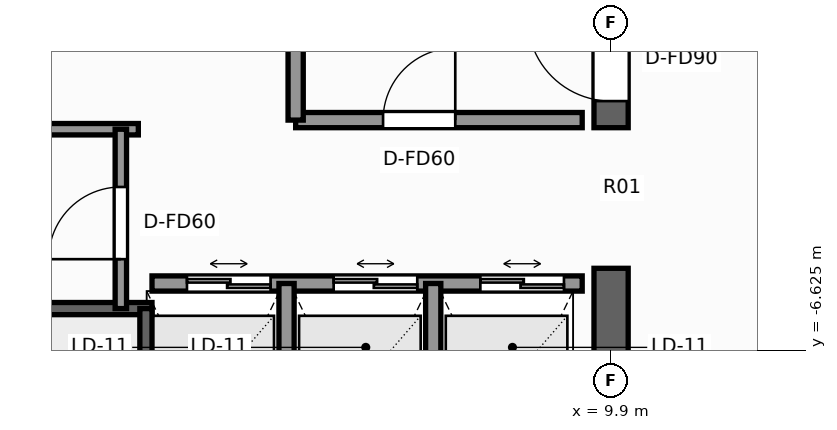
"""IFC4 building model, lengths in metres.
Left out: names, types, materials, properties, quantities, classifications, styles, units other than length and angle.
Written with IfcOpenShell. Run it as: python <this file> out.ifc"""

import sys

from ifc_helpers import new_model, si_unit, direction, frame, frame_2d, origin, place, context, subcontext, project, spatial, rectangle, extrude, element, fill, save


model = new_model("IFC4")
c1 = context("Model", 3, precision=1e-05, world=origin(), true_north=direction((0.0, 1.0)))
c2 = subcontext(c1, "Body", "Model", "MODEL_VIEW")
j1 = project(units=[si_unit("LENGTHUNIT", "METRE"), si_unit("PLANEANGLEUNIT", "RADIAN")], contexts=[c1])
p1 = place(None, origin())
s1 = spatial("IfcSite", under=j1, at=p1, CompositionType="ELEMENT")
p2 = place(p1, origin())
s2 = spatial("IfcBuilding", under=s1, at=p2, CompositionType="ELEMENT")
p3 = place(p2, frame((0.0, 0.0, 244.4)))
s3 = spatial("IfcBuildingStorey", under=s2, at=p3, CompositionType="ELEMENT", Elevation=244.4)
p4 = place(p3, frame((9.9, -9.675, 0.0), z_axis=(0.0, 0.0, 1.0), x_axis=(0.0, 1.0, 0.0)))
e1 = element("IfcWall", 1, at=p4, inside=s3, PredefinedType="SHEAR", context=c2, shape_type="SweptSolid", body=[
    extrude(rectangle(XDim=4.125, YDim=0.45, at=frame_2d((2.062, 0.0))), origin(), (0.0, 0.0, 1.0), 3.5),
])
p5 = place(p3, frame((9.9, -3.7, 0.0), z_axis=(0.0, 0.0, 1.0), x_axis=(0.0, 1.0, 0.0)))
e2 = element("IfcWall", 2, at=p5, inside=s3, PredefinedType="SHEAR", context=c2, shape_type="SweptSolid", body=[
    extrude(rectangle(XDim=13.375, YDim=0.45, at=frame_2d((6.688, 0.0))), origin(), (0.0, 0.0, 1.0), 3.5),
])
p6 = place(p5, frame((0.35, 0.0, 0.0)))
e3 = element("IfcOpeningElement", 3, at=p6, cuts=e2, PredefinedType="OPENING", context=c2, shape_type="SweptSolid", body=[
    extrude(rectangle(XDim=1.1, YDim=2.2, at=frame_2d((0.55, 1.1))), frame((0.0, 0.235, 0.0), z_axis=(0.0, -1.0, 0.0), x_axis=(1.0, 0.0, 0.0)), (0.0, 0.0, 1.0), 0.47),
])
p7 = place(p3, frame((-3.86, -6.08, 0.0), z_axis=(0.0, 0.0, 1.0), x_axis=(1.0, 0.0, 0.0)))
e4 = element("IfcWall", 4, at=p7, inside=s3, PredefinedType="SHEAR", context=c2, shape_type="SweptSolid", body=[
    extrude(rectangle(XDim=7.72, YDim=0.16, at=frame_2d((3.86, 0.0))), origin(), (0.0, 0.0, 1.0), 3.5),
])
p8 = place(p3, frame((3.78, -9.43, 0.0), z_axis=(0.0, 0.0, 1.0), x_axis=(0.0, 1.0, 0.0)))
e5 = element("IfcWall", 5, at=p8, inside=s3, PredefinedType="SHEAR", context=c2, shape_type="SweptSolid", body=[
    extrude(rectangle(XDim=3.35, YDim=0.16, at=frame_2d((1.675, 0.0))), origin(), (0.0, 0.0, 1.0), 3.5),
])
p9 = place(p3, frame((5.75, -3.6, 0.0), z_axis=(0.0, 0.0, 1.0), x_axis=(1.0, 0.0, 0.0)))
e6 = element("IfcWall", 6, at=p9, inside=s3, PredefinedType="SOLIDWALL", context=c2, shape_type="SweptSolid", body=[
    extrude(rectangle(XDim=3.77, YDim=0.2, at=frame_2d((1.885, 0.0))), origin(), (0.0, 0.0, 1.0), 3.25),
])
p10 = place(p9, frame((1.15, 0.0, 0.0)))
e7 = element("IfcOpeningElement", 7, at=p10, cuts=e6, PredefinedType="OPENING", context=c2, shape_type="SweptSolid", body=[
    extrude(rectangle(XDim=0.95, YDim=2.06, at=frame_2d((0.475, 1.03))), frame((0.0, 0.11, 0.0), z_axis=(0.0, -1.0, 0.0), x_axis=(1.0, 0.0, 0.0)), (0.0, 0.0, 1.0), 0.22),
])
p11 = place(p3, frame((5.75, -3.6, 0.0), z_axis=(0.0, 0.0, 1.0), x_axis=(0.0, 1.0, 0.0)))
e8 = element("IfcWall", 8, at=p11, inside=s3, PredefinedType="SOLIDWALL", context=c2, shape_type="SweptSolid", body=[
    extrude(rectangle(XDim=5.57, YDim=0.2, at=frame_2d((2.785, 0.0))), origin(), (0.0, 0.0, 1.0), 3.25),
])
p12 = place(p11, frame((2.75, 0.0, 0.0)))
e9 = element("IfcOpeningElement", 9, at=p12, cuts=e8, PredefinedType="OPENING", context=c2, shape_type="SweptSolid", body=[
    extrude(rectangle(XDim=1.1, YDim=2.2, at=frame_2d((0.55, 1.1))), frame((0.0, 0.11, 0.0), z_axis=(0.0, -1.0, 0.0), x_axis=(1.0, 0.0, 0.0)), (0.0, 0.0, 1.0), 0.22),
])
p13 = place(p3, frame((3.86, -5.75, 0.0), z_axis=(0.0, 0.0, 1.0), x_axis=(1.0, 0.0, 0.0)))
e10 = element("IfcWall", 10, at=p13, inside=s3, PredefinedType="SOLIDWALL", context=c2, shape_type="SweptSolid", body=[
    extrude(rectangle(XDim=5.66, YDim=0.2, at=frame_2d((2.83, 0.0))), origin(), (0.0, 0.0, 1.0), 3.25),
])
p14 = place(p13, frame((0.46, 0.0, 0.0)))
e11 = element("IfcOpeningElement", 11, at=p14, cuts=e10, PredefinedType="OPENING", context=c2, shape_type="SweptSolid", body=[
    extrude(rectangle(XDim=1.1, YDim=2.2, at=frame_2d((0.55, 1.1))), frame((0.0, 0.11, 0.0), z_axis=(0.0, -1.0, 0.0), x_axis=(1.0, 0.0, 0.0)), (0.0, 0.0, 1.0), 0.22),
])
p15 = place(p13, frame((2.39, 0.0, 0.0)))
e12 = element("IfcOpeningElement", 12, at=p15, cuts=e10, PredefinedType="OPENING", context=c2, shape_type="SweptSolid", body=[
    extrude(rectangle(XDim=1.1, YDim=2.2, at=frame_2d((0.55, 1.1))), frame((0.0, 0.11, 0.0), z_axis=(0.0, -1.0, 0.0), x_axis=(1.0, 0.0, 0.0)), (0.0, 0.0, 1.0), 0.22),
])
p16 = place(p13, frame((4.32, 0.0, 0.0)))
e13 = element("IfcOpeningElement", 13, at=p16, cuts=e10, PredefinedType="OPENING", context=c2, shape_type="SweptSolid", body=[
    extrude(rectangle(XDim=1.1, YDim=2.2, at=frame_2d((0.55, 1.1))), frame((0.0, 0.11, 0.0), z_axis=(0.0, -1.0, 0.0), x_axis=(1.0, 0.0, 0.0)), (0.0, 0.0, 1.0), 0.22),
])
for number, where, z_axis, x_axis in (
    (14, (5.63, -9.52, 0.0), (0.0, 0.0, 1.0), (0.0, 1.0, 0.0)),
    (15, (7.56, -9.52, 0.0), (0.0, 0.0, 1.0), (0.0, 1.0, 0.0)),
):
    element("IfcWall", number, at=place(p3, frame(where, z_axis=z_axis, x_axis=x_axis)), inside=s3, PredefinedType="SOLIDWALL", context=c2, shape_type="SweptSolid", body=[
        extrude(rectangle(XDim=3.77, YDim=0.2, at=frame_2d((1.885, 0.0))), origin(), (0.0, 0.0, 1.0), 3.25),
    ])
p17 = place(p3, frame((-3.68, -3.72, 0.0), z_axis=(0.0, 0.0, 1.0), x_axis=(1.0, 0.0, 0.0)))
e16 = element("IfcWall", 16, at=p17, inside=s3, PredefinedType="PARTITIONING", context=c2, shape_type="SweptSolid", body=[
    extrude(rectangle(XDim=7.36, YDim=0.15, at=frame_2d((3.68, 0.0))), origin(), (0.0, 0.0, 1.0), 3.25),
])
p18 = place(p3, frame((3.45, -6.08, 0.0), z_axis=(0.0, 0.0, 1.0), x_axis=(0.0, 1.0, 0.0)))
e17 = element("IfcWall", 17, at=p18, inside=s3, PredefinedType="PARTITIONING", context=c2, shape_type="SweptSolid", body=[
    extrude(rectangle(XDim=2.36, YDim=0.15, at=frame_2d((1.18, 0.0))), origin(), (0.0, 0.0, 1.0), 3.25),
])
p19 = place(p18, frame((0.65, 0.0, 0.0)))
e18 = element("IfcOpeningElement", 18, at=p19, cuts=e17, PredefinedType="OPENING", context=c2, shape_type="SweptSolid", body=[
    extrude(rectangle(XDim=0.95, YDim=2.06, at=frame_2d((0.475, 1.03))), frame((0.0, 0.085, 0.0), z_axis=(0.0, -1.0, 0.0), x_axis=(1.0, 0.0, 0.0)), (0.0, 0.0, 1.0), 0.17),
])
p20 = place(p6, origin())
e19 = element("IfcDoor", 19, at=p20, inside=s3, OperationType="SINGLE_SWING_RIGHT", PredefinedType="DOOR", context=c2, shape_type="SweptSolid", body=[
    extrude(rectangle(XDim=1.1, YDim=2.2, at=frame_2d((0.55, 1.1))), frame((0.0, 0.025, 0.0), z_axis=(0.0, -1.0, 0.0), x_axis=(1.0, 0.0, 0.0)), (0.0, 0.0, 1.0), 0.05),
])
fill(e3, e19)
p21 = place(p14, origin())
e20 = element("IfcDoor", 20, at=p21, inside=s3, OperationType="DOUBLE_DOOR_SLIDING", PredefinedType="DOOR", context=c2, shape_type="SweptSolid", body=[
    extrude(rectangle(XDim=1.1, YDim=2.2, at=frame_2d((0.55, 1.1))), frame((0.0, 0.025, 0.0), z_axis=(0.0, -1.0, 0.0), x_axis=(1.0, 0.0, 0.0)), (0.0, 0.0, 1.0), 0.05),
])
fill(e11, e20)
p22 = place(p15, origin())
e21 = element("IfcDoor", 21, at=p22, inside=s3, OperationType="DOUBLE_DOOR_SLIDING", PredefinedType="DOOR", context=c2, shape_type="SweptSolid", body=[
    extrude(rectangle(XDim=1.1, YDim=2.2, at=frame_2d((0.55, 1.1))), frame((0.0, 0.025, 0.0), z_axis=(0.0, -1.0, 0.0), x_axis=(1.0, 0.0, 0.0)), (0.0, 0.0, 1.0), 0.05),
])
fill(e12, e21)
p23 = place(p16, origin())
e22 = element("IfcDoor", 22, at=p23, inside=s3, OperationType="DOUBLE_DOOR_SLIDING", PredefinedType="DOOR", context=c2, shape_type="SweptSolid", body=[
    extrude(rectangle(XDim=1.1, YDim=2.2, at=frame_2d((0.55, 1.1))), frame((0.0, 0.025, 0.0), z_axis=(0.0, -1.0, 0.0), x_axis=(1.0, 0.0, 0.0)), (0.0, 0.0, 1.0), 0.05),
])
fill(e13, e22)
p24 = place(p10, origin())
e23 = element("IfcDoor", 23, at=p24, inside=s3, OperationType="SINGLE_SWING_RIGHT", PredefinedType="DOOR", context=c2, shape_type="SweptSolid", body=[
    extrude(rectangle(XDim=0.95, YDim=2.06, at=frame_2d((0.475, 1.03))), frame((0.0, 0.025, 0.0), z_axis=(0.0, -1.0, 0.0), x_axis=(1.0, 0.0, 0.0)), (0.0, 0.0, 1.0), 0.05),
])
fill(e7, e23)
p25 = place(p19, origin())
e24 = element("IfcDoor", 24, at=p25, inside=s3, OperationType="SINGLE_SWING_LEFT", PredefinedType="DOOR", context=c2, shape_type="SweptSolid", body=[
    extrude(rectangle(XDim=0.95, YDim=2.06, at=frame_2d((0.475, 1.03))), frame((0.0, 0.025, 0.0), z_axis=(0.0, -1.0, 0.0), x_axis=(1.0, 0.0, 0.0)), (0.0, 0.0, 1.0), 0.05),
])
fill(e18, e24)
save(model, sys.argv[1])
